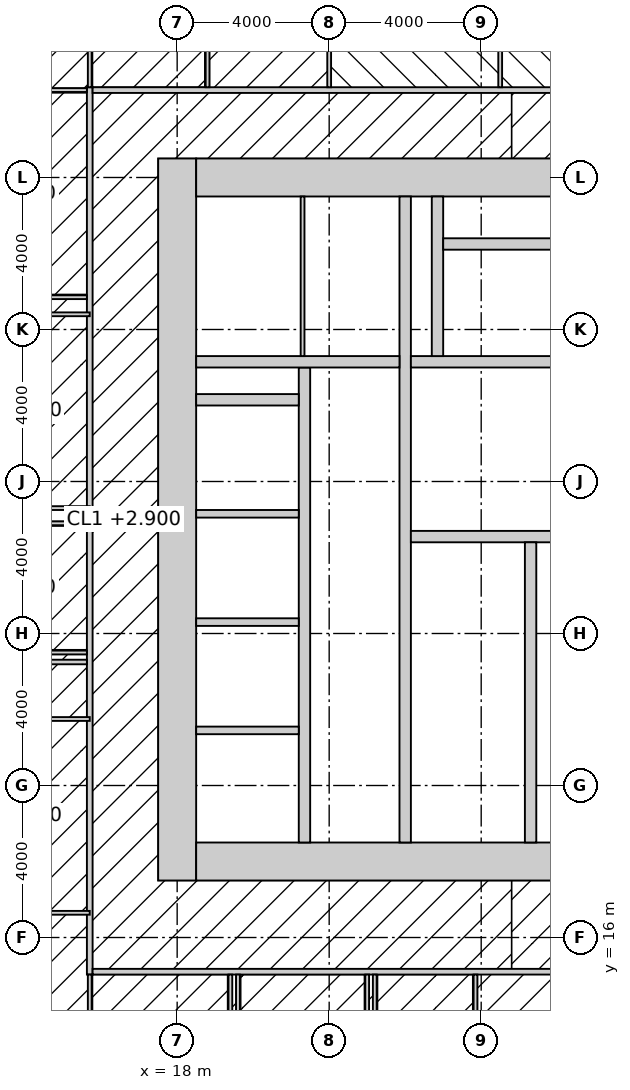
"""IFC4 building model, lengths in metres.
Left out: names, types, materials, properties, quantities, classifications, styles, units other than length and angle.
Written with IfcOpenShell. Run it as: python <this file> out.ifc"""

import sys

from ifc_helpers import new_model, si_unit, direction, frame, frame_2d, origin, place, context, subcontext, project, spatial, rectangle, extrude, element, fill, save


model = new_model("IFC4")
c1 = context("Model", 3, precision=1e-05, world=origin(), true_north=direction((0.0, 1.0)))
c2 = subcontext(c1, "Body", "Model", "MODEL_VIEW")
j1 = project(units=[si_unit("LENGTHUNIT", "METRE"), si_unit("PLANEANGLEUNIT", "RADIAN")], contexts=[c1])
p1 = place(None, origin())
s1 = spatial("IfcSite", under=j1, at=p1, CompositionType="ELEMENT")
p2 = place(p1, origin())
s2 = spatial("IfcBuilding", under=s1, at=p2, CompositionType="ELEMENT")
p3 = place(p2, frame((0.0, 0.0, 286.2)))
s3 = spatial("IfcBuildingStorey", under=s2, at=p3, CompositionType="ELEMENT", Elevation=286.2)
p4 = place(p3, frame((18.0, 17.5, -0.15), z_axis=(0.0, 0.0, 1.0), x_axis=(0.0, 1.0, 0.0)))
e1 = element("IfcWall", 1, at=p4, inside=s3, PredefinedType="SHEAR", context=c2, shape_type="SweptSolid", body=[
    extrude(rectangle(XDim=19.0, YDim=1.0, at=frame_2d((9.5, 0.0))), origin(), (0.0, 0.0, 1.0), 4.0),
])
p5 = place(p3, frame((18.5, 18.0, -0.15), z_axis=(0.0, 0.0, 1.0), x_axis=(1.0, 0.0, 0.0)))
e2 = element("IfcWall", 2, at=p5, inside=s3, PredefinedType="SHEAR", context=c2, shape_type="SweptSolid", body=[
    extrude(rectangle(XDim=17.6, YDim=1.0, at=frame_2d((8.8, 0.0))), origin(), (0.0, 0.0, 1.0), 4.0),
])
p6 = place(p5, frame((3.45, 0.0, 0.15)))
e3 = element("IfcOpeningElement", 3, at=p6, cuts=e2, PredefinedType="OPENING", context=c2, shape_type="SweptSolid", body=[
    extrude(rectangle(XDim=1.5, YDim=2.4, at=frame_2d((0.75, 1.2))), frame((0.0, 0.51, 0.0), z_axis=(0.0, -1.0, 0.0), x_axis=(1.0, 0.0, 0.0)), (0.0, 0.0, 1.0), 1.02),
])
p7 = place(p3, frame((18.5, 36.0, -0.15), z_axis=(0.0, 0.0, 1.0), x_axis=(1.0, 0.0, 0.0)))
e4 = element("IfcWall", 4, at=p7, inside=s3, PredefinedType="SHEAR", context=c2, shape_type="SweptSolid", body=[
    extrude(rectangle(XDim=17.6, YDim=1.0, at=frame_2d((8.8, 0.0))), origin(), (0.0, 0.0, 1.0), 4.0),
])
p8 = place(p3, frame((24.0, 18.5, -0.15), z_axis=(0.0, 0.0, 1.0), x_axis=(0.0, 1.0, 0.0)))
e5 = element("IfcWall", 5, at=p8, inside=s3, PredefinedType="SHEAR", context=c2, shape_type="SweptSolid", body=[
    extrude(rectangle(XDim=17.0, YDim=0.3, at=frame_2d((8.5, 0.0))), origin(), (0.0, 0.0, 1.0), 4.0),
])
p9 = place(p8, frame((9.6, 0.0, 0.15)))
e6 = element("IfcOpeningElement", 6, at=p9, cuts=e5, PredefinedType="OPENING", context=c2, shape_type="SweptSolid", body=[
    extrude(rectangle(XDim=1.5, YDim=2.4, at=frame_2d((0.75, 1.2))), frame((0.0, 0.16, 0.0), z_axis=(0.0, -1.0, 0.0), x_axis=(1.0, 0.0, 0.0)), (0.0, 0.0, 1.0), 0.32),
])
p10 = place(p3, frame((24.15, 26.55, -0.15), z_axis=(0.0, 0.0, 1.0), x_axis=(1.0, 0.0, 0.0)))
e7 = element("IfcWall", 7, at=p10, inside=s3, PredefinedType="SHEAR", context=c2, shape_type="SweptSolid", body=[
    extrude(rectangle(XDim=11.25, YDim=0.3, at=frame_2d((5.625, 0.0))), origin(), (0.0, 0.0, 1.0), 4.0),
])
p11 = place(p10, frame((9.25, 0.0, 0.15)))
e8 = element("IfcOpeningElement", 8, at=p11, cuts=e7, PredefinedType="OPENING", context=c2, shape_type="SweptSolid", body=[
    extrude(rectangle(XDim=1.0, YDim=2.2, at=frame_2d((0.5, 1.1))), frame((0.0, 0.16, 0.0), z_axis=(0.0, -1.0, 0.0), x_axis=(1.0, 0.0, 0.0)), (0.0, 0.0, 1.0), 0.32),
])
p12 = place(p10, frame((4.9, 0.0, 0.15)))
e9 = element("IfcOpeningElement", 9, at=p12, cuts=e7, PredefinedType="OPENING", context=c2, shape_type="SweptSolid", body=[
    extrude(rectangle(XDim=1.5, YDim=2.4, at=frame_2d((0.75, 1.2))), frame((0.0, 0.16, 0.0), z_axis=(0.0, -1.0, 0.0), x_axis=(1.0, 0.0, 0.0)), (0.0, 0.0, 1.0), 0.32),
])
p13 = place(p3, frame((27.3, 18.5, -0.15), z_axis=(0.0, 0.0, 1.0), x_axis=(0.0, 1.0, 0.0)))
e10 = element("IfcWall", 10, at=p13, inside=s3, PredefinedType="SHEAR", context=c2, shape_type="SweptSolid", body=[
    extrude(rectangle(XDim=7.9, YDim=0.3, at=frame_2d((3.95, 0.0))), origin(), (0.0, 0.0, 1.0), 4.0),
])
p14 = place(p13, frame((6.4, 0.0, 0.15)))
e11 = element("IfcOpeningElement", 11, at=p14, cuts=e10, PredefinedType="OPENING", context=c2, shape_type="SweptSolid", body=[
    extrude(rectangle(XDim=1.0, YDim=2.2, at=frame_2d((0.5, 1.1))), frame((0.0, 0.16, 0.0), z_axis=(0.0, -1.0, 0.0), x_axis=(1.0, 0.0, 0.0)), (0.0, 0.0, 1.0), 0.32),
])
p15 = place(p3, frame((24.15, 31.15, -0.15), z_axis=(0.0, 0.0, 1.0), x_axis=(1.0, 0.0, 0.0)))
e12 = element("IfcWall", 12, at=p15, inside=s3, PredefinedType="SHEAR", context=c2, shape_type="SweptSolid", body=[
    extrude(rectangle(XDim=11.25, YDim=0.3, at=frame_2d((5.625, 0.0))), origin(), (0.0, 0.0, 1.0), 4.0),
])
p16 = place(p15, frame((3.15, 0.0, 0.15)))
e13 = element("IfcOpeningElement", 13, at=p16, cuts=e12, PredefinedType="OPENING", context=c2, shape_type="SweptSolid", body=[
    extrude(rectangle(XDim=1.0, YDim=2.2, at=frame_2d((0.5, 1.1))), frame((0.0, 0.16, 0.0), z_axis=(0.0, -1.0, 0.0), x_axis=(1.0, 0.0, 0.0)), (0.0, 0.0, 1.0), 0.32),
])
p17 = place(p15, frame((7.25, 0.0, 0.15)))
e14 = element("IfcOpeningElement", 14, at=p17, cuts=e12, PredefinedType="OPENING", context=c2, shape_type="SweptSolid", body=[
    extrude(rectangle(XDim=1.4, YDim=2.4, at=frame_2d((0.7, 1.2))), frame((0.0, 0.16, 0.0), z_axis=(0.0, -1.0, 0.0), x_axis=(1.0, 0.0, 0.0)), (0.0, 0.0, 1.0), 0.32),
])
p18 = place(p3, frame((21.35, 18.5, -0.15), z_axis=(0.0, 0.0, 1.0), x_axis=(0.0, 1.0, 0.0)))
e15 = element("IfcWall", 15, at=p18, inside=s3, PredefinedType="SHEAR", context=c2, shape_type="SweptSolid", body=[
    extrude(rectangle(XDim=12.5, YDim=0.3, at=frame_2d((6.25, 0.0))), origin(), (0.0, 0.0, 1.0), 4.0),
])
p19 = place(p18, frame((0.875, 0.0, 0.15)))
e16 = element("IfcOpeningElement", 16, at=p19, cuts=e15, PredefinedType="OPENING", context=c2, shape_type="SweptSolid", body=[
    extrude(rectangle(XDim=1.1, YDim=2.2, at=frame_2d((0.55, 1.1))), frame((0.0, 0.16, 0.0), z_axis=(0.0, -1.0, 0.0), x_axis=(1.0, 0.0, 0.0)), (0.0, 0.0, 1.0), 0.32),
])
p20 = place(p18, frame((3.825, 0.0, 0.15)))
e17 = element("IfcOpeningElement", 17, at=p20, cuts=e15, PredefinedType="OPENING", context=c2, shape_type="SweptSolid", body=[
    extrude(rectangle(XDim=1.1, YDim=2.2, at=frame_2d((0.55, 1.1))), frame((0.0, 0.16, 0.0), z_axis=(0.0, -1.0, 0.0), x_axis=(1.0, 0.0, 0.0)), (0.0, 0.0, 1.0), 0.32),
])
p21 = place(p18, frame((6.675, 0.0, 0.15)))
e18 = element("IfcOpeningElement", 18, at=p21, cuts=e15, PredefinedType="OPENING", context=c2, shape_type="SweptSolid", body=[
    extrude(rectangle(XDim=1.1, YDim=2.2, at=frame_2d((0.55, 1.1))), frame((0.0, 0.16, 0.0), z_axis=(0.0, -1.0, 0.0), x_axis=(1.0, 0.0, 0.0)), (0.0, 0.0, 1.0), 0.32),
])
p22 = place(p18, frame((9.575, 0.0, 0.15)))
e19 = element("IfcOpeningElement", 19, at=p22, cuts=e15, PredefinedType="OPENING", context=c2, shape_type="SweptSolid", body=[
    extrude(rectangle(XDim=1.1, YDim=2.2, at=frame_2d((0.55, 1.1))), frame((0.0, 0.16, 0.0), z_axis=(0.0, -1.0, 0.0), x_axis=(1.0, 0.0, 0.0)), (0.0, 0.0, 1.0), 0.32),
])
p23 = place(p3, frame((18.5, 31.15, -0.15), z_axis=(0.0, 0.0, 1.0), x_axis=(1.0, 0.0, 0.0)))
e20 = element("IfcWall", 20, at=p23, inside=s3, PredefinedType="SHEAR", context=c2, shape_type="SweptSolid", body=[
    extrude(rectangle(XDim=5.35, YDim=0.3, at=frame_2d((2.675, 0.0))), origin(), (0.0, 0.0, 1.0), 4.0),
])
p24 = place(p23, frame((3.4, 0.0, 0.15)))
e21 = element("IfcOpeningElement", 21, at=p24, cuts=e20, PredefinedType="OPENING", context=c2, shape_type="SweptSolid", body=[
    extrude(rectangle(XDim=1.0, YDim=2.2, at=frame_2d((0.5, 1.1))), frame((0.0, 0.16, 0.0), z_axis=(0.0, -1.0, 0.0), x_axis=(1.0, 0.0, 0.0)), (0.0, 0.0, 1.0), 0.32),
])
p25 = place(p3, frame((18.5, 30.15, -0.15), z_axis=(0.0, 0.0, 1.0), x_axis=(1.0, 0.0, 0.0)))
e22 = element("IfcWall", 22, at=p25, inside=s3, PredefinedType="SHEAR", context=c2, shape_type="SweptSolid", body=[
    extrude(rectangle(XDim=2.7, YDim=0.3, at=frame_2d((1.35, 0.0))), origin(), (0.0, 0.0, 1.0), 4.0),
])
p26 = place(p3, frame((24.85, 31.3, -0.15), z_axis=(0.0, 0.0, 1.0), x_axis=(0.0, 1.0, 0.0)))
e23 = element("IfcWall", 23, at=p26, inside=s3, PredefinedType="SHEAR", context=c2, shape_type="SweptSolid", body=[
    extrude(rectangle(XDim=4.2, YDim=0.3, at=frame_2d((2.1, 0.0))), origin(), (0.0, 0.0, 1.0), 4.0),
])
p27 = place(p3, frame((25.0, 34.25, -0.15), z_axis=(0.0, 0.0, 1.0), x_axis=(1.0, 0.0, 0.0)))
e24 = element("IfcWall", 24, at=p27, inside=s3, PredefinedType="SHEAR", context=c2, shape_type="SweptSolid", body=[
    extrude(rectangle(XDim=8.6, YDim=0.3, at=frame_2d((4.3, 0.0))), origin(), (0.0, 0.0, 1.0), 4.0),
])
for number, where, z_axis, x_axis in (
    (25, (18.5, 21.45, -0.15), (0.0, 0.0, 1.0), (1.0, 0.0, 0.0)),
    (26, (18.5, 24.3, -0.15), (0.0, 0.0, 1.0), (1.0, 0.0, 0.0)),
    (27, (18.5, 27.15, -0.15), (0.0, 0.0, 1.0), (1.0, 0.0, 0.0)),
):
    element("IfcWall", number, at=place(p3, frame(where, z_axis=z_axis, x_axis=x_axis)), inside=s3, PredefinedType="SOLIDWALL", context=c2, shape_type="SweptSolid", body=[
        extrude(rectangle(XDim=2.7, YDim=0.2, at=frame_2d((1.35, 0.0))), origin(), (0.0, 0.0, 1.0), 4.0),
    ])
p28 = place(p3, frame((21.3, 31.3, 0.0), z_axis=(0.0, 0.0, 1.0), x_axis=(0.0, 1.0, 0.0)))
e28 = element("IfcWall", 28, at=p28, inside=s3, PredefinedType="PARTITIONING", context=c2, shape_type="SweptSolid", body=[
    extrude(rectangle(XDim=4.2, YDim=0.1, at=frame_2d((2.1, 0.0))), origin(), (0.0, 0.0, 1.0), 3.85),
])
p29 = place(p28, frame((1.55, 0.0, 0.0)))
e29 = element("IfcOpeningElement", 29, at=p29, cuts=e28, PredefinedType="OPENING", context=c2, shape_type="SweptSolid", body=[
    extrude(rectangle(XDim=1.0, YDim=2.2, at=frame_2d((0.5, 1.1))), frame((0.0, 0.06, 0.0), z_axis=(0.0, -1.0, 0.0), x_axis=(1.0, 0.0, 0.0)), (0.0, 0.0, 1.0), 0.12),
])
p30 = place(p3, frame((15.7, 15.025, 0.0), z_axis=(0.0, 0.0, 1.0), x_axis=(0.0, 1.0, 0.0)))
e30 = element("IfcWall", 30, at=p30, inside=s3, PredefinedType="PARTITIONING", context=c2, shape_type="SweptSolid", body=[
    extrude(rectangle(XDim=23.35, YDim=0.15, at=frame_2d((11.675, 0.0))), origin(), (0.0, 0.0, 1.0), 3.85),
])
p31 = place(p30, frame((3.275, 0.0, 0.0)))
e31 = element("IfcOpeningElement", 31, at=p31, cuts=e30, PredefinedType="OPENING", context=c2, shape_type="SweptSolid", body=[
    extrude(rectangle(XDim=1.8, YDim=2.4, at=frame_2d((0.9, 1.2))), frame((0.0, 0.085, 0.0), z_axis=(0.0, -1.0, 0.0), x_axis=(1.0, 0.0, 0.0)), (0.0, 0.0, 1.0), 0.17),
])
p32 = place(p30, frame((14.825, 0.0, 0.0)))
e32 = element("IfcOpeningElement", 32, at=p32, cuts=e30, PredefinedType="OPENING", context=c2, shape_type="SweptSolid", body=[
    extrude(rectangle(XDim=1.8, YDim=2.4, at=frame_2d((0.9, 1.2))), frame((0.0, 0.085, 0.0), z_axis=(0.0, -1.0, 0.0), x_axis=(1.0, 0.0, 0.0)), (0.0, 0.0, 1.0), 0.17),
])
p33 = place(p3, frame((15.775, 15.1, 0.0), z_axis=(0.0, 0.0, 1.0), x_axis=(1.0, 0.0, 0.0)))
e33 = element("IfcWall", 33, at=p33, inside=s3, PredefinedType="PARTITIONING", context=c2, shape_type="SweptSolid", body=[
    extrude(rectangle(XDim=22.65, YDim=0.15, at=frame_2d((11.325, 0.0))), origin(), (0.0, 0.0, 1.0), 3.85),
])
p34 = place(p3, frame((15.775, 38.3, 0.0), z_axis=(0.0, 0.0, 1.0), x_axis=(1.0, 0.0, 0.0)))
e34 = element("IfcWall", 34, at=p34, inside=s3, PredefinedType="PARTITIONING", context=c2, shape_type="SweptSolid", body=[
    extrude(rectangle(XDim=22.65, YDim=0.15, at=frame_2d((11.325, 0.0))), origin(), (0.0, 0.0, 1.0), 3.85),
])
p35 = place(p34, frame((7.975, 0.0, 0.0)))
e35 = element("IfcOpeningElement", 35, at=p35, cuts=e34, PredefinedType="OPENING", context=c2, shape_type="SweptSolid", body=[
    extrude(rectangle(XDim=0.9, YDim=2.1, at=frame_2d((0.45, 1.05))), frame((0.0, 0.085, 0.0), z_axis=(0.0, -1.0, 0.0), x_axis=(1.0, 0.0, 0.0)), (0.0, 0.0, 1.0), 0.17),
])
p36 = place(p34, frame((11.725, 0.0, 0.0)))
e36 = element("IfcOpeningElement", 36, at=p36, cuts=e34, PredefinedType="OPENING", context=c2, shape_type="SweptSolid", body=[
    extrude(rectangle(XDim=1.0, YDim=2.1, at=frame_2d((0.5, 1.05))), frame((0.0, 0.085, 0.0), z_axis=(0.0, -1.0, 0.0), x_axis=(1.0, 0.0, 0.0)), (0.0, 0.0, 1.0), 0.17),
])
p37 = place(p34, frame((15.575, 0.0, 0.0)))
e37 = element("IfcOpeningElement", 37, at=p37, cuts=e34, PredefinedType="OPENING", context=c2, shape_type="SweptSolid", body=[
    extrude(rectangle(XDim=0.9, YDim=2.1, at=frame_2d((0.45, 1.05))), frame((0.0, 0.085, 0.0), z_axis=(0.0, -1.0, 0.0), x_axis=(1.0, 0.0, 0.0)), (0.0, 0.0, 1.0), 0.17),
])
p38 = place(p3, frame((22.0, 38.375, 0.0), z_axis=(0.0, 0.0, 1.0), x_axis=(0.0, 1.0, 0.0)))
e38 = element("IfcWall", 38, at=p38, inside=s3, PredefinedType="PARTITIONING", context=c2, shape_type="SweptSolid", body=[
    extrude(rectangle(XDim=3.675, YDim=0.1, at=frame_2d((1.837, 0.0))), origin(), (0.0, 0.0, 1.0), 2.95),
])
p39 = place(p3, frame((26.5, 38.375, 0.0), z_axis=(0.0, 0.0, 1.0), x_axis=(0.0, 1.0, 0.0)))
e39 = element("IfcWall", 39, at=p39, inside=s3, PredefinedType="PARTITIONING", context=c2, shape_type="SweptSolid", body=[
    extrude(rectangle(XDim=3.575, YDim=0.1, at=frame_2d((1.788, 0.0))), origin(), (0.0, 0.0, 1.0), 3.85),
])
p40 = place(p3, frame((6.3, 23.25, 0.0), z_axis=(0.0, 0.0, 1.0), x_axis=(1.0, 0.0, 0.0)))
e40 = element("IfcWall", 40, at=p40, inside=s3, PredefinedType="PARTITIONING", context=c2, shape_type="SweptSolid", body=[
    extrude(rectangle(XDim=9.325, YDim=0.12, at=frame_2d((4.663, 0.0))), origin(), (0.0, 0.0, 1.0), 3.85),
])
for number, where, z_axis, x_axis in (
    (41, (10.85, 23.5, 0.0), (0.0, 0.0, 1.0), (1.0, 0.0, 0.0)),
    (42, (10.85, 26.9, 0.0), (0.0, 0.0, 1.0), (1.0, 0.0, 0.0)),
    (43, (10.85, 32.85, 0.0), (0.0, 0.0, 1.0), (1.0, 0.0, 0.0)),
    (44, (10.85, 38.3, 0.0), (0.0, 0.0, 1.0), (1.0, 0.0, 0.0)),
):
    element("IfcWall", number, at=place(p3, frame(where, z_axis=z_axis, x_axis=x_axis)), inside=s3, PredefinedType="PARTITIONING", context=c2, shape_type="SweptSolid", body=[
        extrude(rectangle(XDim=4.775, YDim=0.1, at=frame_2d((2.387, 0.0))), origin(), (0.0, 0.0, 1.0), 3.85),
    ])
p41 = place(p3, frame((15.7, 11.55, 0.0), z_axis=(0.0, 0.0, 1.0), x_axis=(0.0, 1.0, 0.0)))
e45 = element("IfcWall", 45, at=p41, inside=s3, PredefinedType="PARTITIONING", context=c2, shape_type="SweptSolid", body=[
    extrude(rectangle(XDim=3.475, YDim=0.1, at=frame_2d((1.737, 0.0))), origin(), (0.0, 0.0, 1.0), 3.85),
])
for number, where, z_axis, x_axis in (
    (46, (15.7, 38.375, 0.0), (0.0, 0.0, 1.0), (0.0, 1.0, 0.0)),
    (47, (18.8, 38.375, 0.0), (0.0, 0.0, 1.0), (0.0, 1.0, 0.0)),
):
    element("IfcWall", number, at=place(p3, frame(where, z_axis=z_axis, x_axis=x_axis)), inside=s3, PredefinedType="PARTITIONING", context=c2, shape_type="SweptSolid", body=[
        extrude(rectangle(XDim=2.875, YDim=0.1, at=frame_2d((1.438, 0.0))), origin(), (0.0, 0.0, 1.0), 3.85),
    ])
for number, where, z_axis, x_axis in (
    (48, (19.4, 11.55, 0.0), (0.0, 0.0, 1.0), (0.0, 1.0, 0.0)),
    (49, (19.6, 11.55, 0.0), (0.0, 0.0, 1.0), (0.0, 1.0, 0.0)),
    (50, (23.0, 11.55, 0.0), (0.0, 0.0, 1.0), (0.0, 1.0, 0.0)),
    (51, (23.2, 11.55, 0.0), (0.0, 0.0, 1.0), (0.0, 1.0, 0.0)),
):
    element("IfcWall", number, at=place(p3, frame(where, z_axis=z_axis, x_axis=x_axis)), inside=s3, PredefinedType="PARTITIONING", context=c2, shape_type="SweptSolid", body=[
        extrude(rectangle(XDim=3.475, YDim=0.1, at=frame_2d((1.737, 0.0))), origin(), (0.0, 0.0, 1.0), 3.85),
    ])
p42 = place(p3, frame((25.85, 11.55, 0.0), z_axis=(0.0, 0.0, 1.0), x_axis=(0.0, 1.0, 0.0)))
e52 = element("IfcWall", 52, at=p42, inside=s3, PredefinedType="PARTITIONING", context=c2, shape_type="SweptSolid", body=[
    extrude(rectangle(XDim=3.475, YDim=0.1, at=frame_2d((1.737, 0.0))), origin(), (0.0, 0.0, 1.0), 2.95),
])
for number, where, z_axis, x_axis in (
    (53, (15.7, 21.75, 0.0), (0.0, 0.0, 1.0), (-1.0, 0.0, 0.0)),
    (54, (11.2, 16.65, 0.0), (0.0, 0.0, 1.0), (1.0, 0.0, 0.0)),
    (55, (15.7, 32.4, 0.0), (0.0, 0.0, 1.0), (-1.0, 0.0, 0.0)),
    (56, (11.2, 27.3, 0.0), (0.0, 0.0, 1.0), (1.0, 0.0, 0.0)),
):
    element("IfcWall", number, at=place(p3, frame(where, z_axis=z_axis, x_axis=x_axis)), inside=s3, PredefinedType="PARTITIONING", context=c2, shape_type="SweptSolid", body=[
        extrude(rectangle(XDim=4.5, YDim=0.1, at=frame_2d((2.25, 0.0))), origin(), (0.0, 0.0, 1.0), 3.85),
    ])
p43 = place(p14, origin())
e57 = element("IfcDoor", 57, at=p43, inside=s3, OperationType="SINGLE_SWING_RIGHT", PredefinedType="DOOR", context=c2, shape_type="SweptSolid", body=[
    extrude(rectangle(XDim=1.0, YDim=2.2, at=frame_2d((0.5, 1.1))), frame((0.0, 0.025, 0.0), z_axis=(0.0, -1.0, 0.0), x_axis=(1.0, 0.0, 0.0)), (0.0, 0.0, 1.0), 0.05),
])
fill(e11, e57)
p44 = place(p9, origin())
e58 = element("IfcDoor", 58, at=p44, inside=s3, OperationType="DOUBLE_DOOR_DOUBLE_SWING", PredefinedType="DOOR", context=c2, shape_type="SweptSolid", body=[
    extrude(rectangle(XDim=1.5, YDim=2.4, at=frame_2d((0.75, 1.2))), frame((0.0, 0.025, 0.0), z_axis=(0.0, -1.0, 0.0), x_axis=(1.0, 0.0, 0.0)), (0.0, 0.0, 1.0), 0.05),
])
fill(e6, e58)
p45 = place(p24, origin())
e59 = element("IfcDoor", 59, at=p45, inside=s3, OperationType="SINGLE_SWING_LEFT", PredefinedType="DOOR", context=c2, shape_type="SweptSolid", body=[
    extrude(rectangle(XDim=1.0, YDim=2.2, at=frame_2d((0.5, 1.1))), frame((0.0, 0.025, 0.0), z_axis=(0.0, -1.0, 0.0), x_axis=(1.0, 0.0, 0.0)), (0.0, 0.0, 1.0), 0.05),
])
fill(e21, e59)
p46 = place(p29, origin())
e60 = element("IfcDoor", 60, at=p46, inside=s3, OperationType="SINGLE_SWING_LEFT", PredefinedType="DOOR", context=c2, shape_type="SweptSolid", body=[
    extrude(rectangle(XDim=1.0, YDim=2.2, at=frame_2d((0.5, 1.1))), frame((0.0, 0.025, 0.0), z_axis=(0.0, -1.0, 0.0), x_axis=(1.0, 0.0, 0.0)), (0.0, 0.0, 1.0), 0.05),
])
fill(e29, e60)
p47 = place(p16, origin())
e61 = element("IfcDoor", 61, at=p47, inside=s3, OperationType="SINGLE_SWING_LEFT", PredefinedType="DOOR", context=c2, shape_type="SweptSolid", body=[
    extrude(rectangle(XDim=1.0, YDim=2.2, at=frame_2d((0.5, 1.1))), frame((0.0, 0.025, 0.0), z_axis=(0.0, -1.0, 0.0), x_axis=(1.0, 0.0, 0.0)), (0.0, 0.0, 1.0), 0.05),
])
fill(e13, e61)
p48 = place(p6, origin())
e62 = element("IfcDoor", 62, at=p48, inside=s3, OperationType="DOUBLE_DOOR_DOUBLE_SWING", PredefinedType="DOOR", context=c2, shape_type="SweptSolid", body=[
    extrude(rectangle(XDim=1.5, YDim=2.4, at=frame_2d((0.75, 1.2))), frame((0.0, 0.025, 0.0), z_axis=(0.0, -1.0, 0.0), x_axis=(1.0, 0.0, 0.0)), (0.0, 0.0, 1.0), 0.05),
])
fill(e3, e62)
p49 = place(p35, origin())
e63 = element("IfcDoor", 63, at=p49, inside=s3, OperationType="SINGLE_SWING_LEFT", PredefinedType="DOOR", context=c2, shape_type="SweptSolid", body=[
    extrude(rectangle(XDim=0.9, YDim=2.1, at=frame_2d((0.45, 1.05))), frame((0.0, 0.025, 0.0), z_axis=(0.0, -1.0, 0.0), x_axis=(1.0, 0.0, 0.0)), (0.0, 0.0, 1.0), 0.05),
])
fill(e35, e63)
p50 = place(p36, origin())
e64 = element("IfcDoor", 64, at=p50, inside=s3, OperationType="SLIDING_TO_LEFT", PredefinedType="DOOR", context=c2, shape_type="SweptSolid", body=[
    extrude(rectangle(XDim=1.0, YDim=2.1, at=frame_2d((0.5, 1.05))), frame((0.0, 0.025, 0.0), z_axis=(0.0, -1.0, 0.0), x_axis=(1.0, 0.0, 0.0)), (0.0, 0.0, 1.0), 0.05),
])
fill(e36, e64)
p51 = place(p31, origin())
e65 = element("IfcDoor", 65, at=p51, inside=s3, OperationType="DOUBLE_DOOR_DOUBLE_SWING", PredefinedType="DOOR", context=c2, shape_type="SweptSolid", body=[
    extrude(rectangle(XDim=1.8, YDim=2.4, at=frame_2d((0.9, 1.2))), frame((0.0, 0.025, 0.0), z_axis=(0.0, -1.0, 0.0), x_axis=(1.0, 0.0, 0.0)), (0.0, 0.0, 1.0), 0.05),
])
fill(e31, e65)
p52 = place(p32, origin())
e66 = element("IfcDoor", 66, at=p52, inside=s3, OperationType="DOUBLE_DOOR_DOUBLE_SWING", PredefinedType="DOOR", context=c2, shape_type="SweptSolid", body=[
    extrude(rectangle(XDim=1.8, YDim=2.4, at=frame_2d((0.9, 1.2))), frame((0.0, 0.025, 0.0), z_axis=(0.0, -1.0, 0.0), x_axis=(1.0, 0.0, 0.0)), (0.0, 0.0, 1.0), 0.05),
])
fill(e32, e66)
p53 = place(p19, origin())
e67 = element("IfcDoor", 67, at=p53, inside=s3, OperationType="DOUBLE_DOOR_SLIDING", PredefinedType="DOOR", context=c2, shape_type="SweptSolid", body=[
    extrude(rectangle(XDim=1.1, YDim=2.2, at=frame_2d((0.55, 1.1))), frame((0.0, 0.025, 0.0), z_axis=(0.0, -1.0, 0.0), x_axis=(1.0, 0.0, 0.0)), (0.0, 0.0, 1.0), 0.05),
])
fill(e16, e67)
p54 = place(p20, origin())
e68 = element("IfcDoor", 68, at=p54, inside=s3, OperationType="DOUBLE_DOOR_SLIDING", PredefinedType="DOOR", context=c2, shape_type="SweptSolid", body=[
    extrude(rectangle(XDim=1.1, YDim=2.2, at=frame_2d((0.55, 1.1))), frame((0.0, 0.025, 0.0), z_axis=(0.0, -1.0, 0.0), x_axis=(1.0, 0.0, 0.0)), (0.0, 0.0, 1.0), 0.05),
])
fill(e17, e68)
p55 = place(p21, origin())
e69 = element("IfcDoor", 69, at=p55, inside=s3, OperationType="DOUBLE_DOOR_SLIDING", PredefinedType="DOOR", context=c2, shape_type="SweptSolid", body=[
    extrude(rectangle(XDim=1.1, YDim=2.2, at=frame_2d((0.55, 1.1))), frame((0.0, 0.025, 0.0), z_axis=(0.0, -1.0, 0.0), x_axis=(1.0, 0.0, 0.0)), (0.0, 0.0, 1.0), 0.05),
])
fill(e18, e69)
p56 = place(p22, origin())
e70 = element("IfcDoor", 70, at=p56, inside=s3, OperationType="DOUBLE_DOOR_SLIDING", PredefinedType="DOOR", context=c2, shape_type="SweptSolid", body=[
    extrude(rectangle(XDim=1.1, YDim=2.2, at=frame_2d((0.55, 1.1))), frame((0.0, 0.025, 0.0), z_axis=(0.0, -1.0, 0.0), x_axis=(1.0, 0.0, 0.0)), (0.0, 0.0, 1.0), 0.05),
])
fill(e19, e70)
save(model, sys.argv[1])
